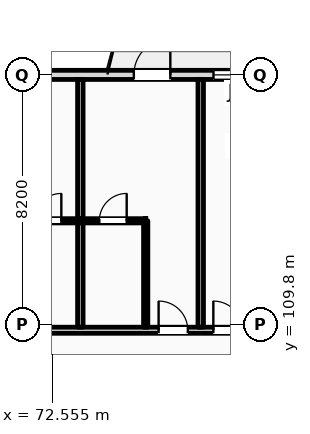
"""IFC4 building model, lengths in metres.
Left out: names, types, materials, properties, quantities, classifications, styles, units other than length and angle.
Written with IfcOpenShell. Run it as: python <this file> out.ifc"""

import sys

from ifc_helpers import new_model, si_unit, direction, frame, frame_2d, origin, place, context, subcontext, project, spatial, rectangle, extrude, element, fill, save


model = new_model("IFC4")
c1 = context("Model", 3, precision=1e-05, world=origin(), true_north=direction((0.0, 1.0)))
c2 = subcontext(c1, "Body", "Model", "MODEL_VIEW")
j1 = project(units=[si_unit("LENGTHUNIT", "METRE"), si_unit("PLANEANGLEUNIT", "RADIAN")], contexts=[c1])
p1 = place(None, origin())
s1 = spatial("IfcSite", under=j1, at=p1, CompositionType="ELEMENT")
p2 = place(p1, origin())
s2 = spatial("IfcBuilding", under=s1, at=p2, CompositionType="ELEMENT")
p3 = place(p2, frame((0.0, 0.0, 20.4)))
s3 = spatial("IfcBuildingStorey", under=s2, at=p3, CompositionType="ELEMENT", Elevation=20.4)
p4 = place(p3, frame((22.5, 118.0, 0.0), z_axis=(0.0, 0.0, 1.0), x_axis=(1.0, 0.0, 0.0)))
e1 = element("IfcWall", 1, at=p4, inside=s3, PredefinedType="STANDARD", context=c2, shape_type="SweptSolid", body=[
    extrude(rectangle(XDim=97.5, YDim=0.3, at=frame_2d((48.75, 0.0))), origin(), (0.0, 0.0, 1.0), 3.38),
])
p5 = place(p4, frame((0.91, 0.0, 0.9)))
e2 = element("IfcOpeningElement", 2, at=p5, cuts=e1, PredefinedType="OPENING", context=c2, shape_type="SweptSolid", body=[
    extrude(rectangle(XDim=0.9, YDim=1.8, at=frame_2d((0.45, 0.9))), frame((0.0, 0.16, 0.0), z_axis=(0.0, -1.0, 0.0), x_axis=(1.0, 0.0, 0.0)), (0.0, 0.0, 1.0), 0.32),
])
p6 = place(p4, frame((6.36, 0.0, 0.0)))
e3 = element("IfcOpeningElement", 3, at=p6, cuts=e1, PredefinedType="OPENING", context=c2, shape_type="SweptSolid", body=[
    extrude(rectangle(XDim=1.2, YDim=2.25, at=frame_2d((0.6, 1.125))), frame((0.0, 0.16, 0.0), z_axis=(0.0, -1.0, 0.0), x_axis=(1.0, 0.0, 0.0)), (0.0, 0.0, 1.0), 0.32),
])
p7 = place(p4, frame((11.41, 0.0, 0.9)))
e4 = element("IfcOpeningElement", 4, at=p7, cuts=e1, PredefinedType="OPENING", context=c2, shape_type="SweptSolid", body=[
    extrude(rectangle(XDim=1.1, YDim=1.9, at=frame_2d((0.55, 0.95))), frame((0.0, 0.16, 0.0), z_axis=(0.0, -1.0, 0.0), x_axis=(1.0, 0.0, 0.0)), (0.0, 0.0, 1.0), 0.32),
])
p8 = place(p4, frame((14.335, 0.0, 0.9)))
e5 = element("IfcOpeningElement", 5, at=p8, cuts=e1, PredefinedType="OPENING", context=c2, shape_type="SweptSolid", body=[
    extrude(rectangle(XDim=1.65, YDim=1.95, at=frame_2d((0.825, 0.975))), frame((0.0, 0.16, 0.0), z_axis=(0.0, -1.0, 0.0), x_axis=(1.0, 0.0, 0.0)), (0.0, 0.0, 1.0), 0.32),
])
p9 = place(p4, frame((19.26, 0.0, 0.9)))
e6 = element("IfcOpeningElement", 6, at=p9, cuts=e1, PredefinedType="OPENING", context=c2, shape_type="SweptSolid", body=[
    extrude(rectangle(XDim=1.35, YDim=2.0, at=frame_2d((0.675, 1.0))), frame((0.0, 0.16, 0.0), z_axis=(0.0, -1.0, 0.0), x_axis=(1.0, 0.0, 0.0)), (0.0, 0.0, 1.0), 0.32),
])
p10 = place(p4, frame((22.8, 0.0, 0.0)))
e7 = element("IfcOpeningElement", 7, at=p10, cuts=e1, PredefinedType="OPENING", context=c2, shape_type="SweptSolid", body=[
    extrude(rectangle(XDim=1.2, YDim=2.25, at=frame_2d((0.6, 1.125))), frame((0.0, 0.16, 0.0), z_axis=(0.0, -1.0, 0.0), x_axis=(1.0, 0.0, 0.0)), (0.0, 0.0, 1.0), 0.32),
])
p11 = place(p4, frame((26.91, 0.0, 0.9)))
e8 = element("IfcOpeningElement", 8, at=p11, cuts=e1, PredefinedType="OPENING", context=c2, shape_type="SweptSolid", body=[
    extrude(rectangle(XDim=2.1, YDim=2.1, at=frame_2d((1.05, 1.05))), frame((0.0, 0.16, 0.0), z_axis=(0.0, -1.0, 0.0), x_axis=(1.0, 0.0, 0.0)), (0.0, 0.0, 1.0), 0.32),
])
p12 = place(p4, frame((30.835, 0.0, 0.9)))
e9 = element("IfcOpeningElement", 9, at=p12, cuts=e1, PredefinedType="OPENING", context=c2, shape_type="SweptSolid", body=[
    extrude(rectangle(XDim=2.25, YDim=2.15, at=frame_2d((1.125, 1.075))), frame((0.0, 0.16, 0.0), z_axis=(0.0, -1.0, 0.0), x_axis=(1.0, 0.0, 0.0)), (0.0, 0.0, 1.0), 0.32),
])
p13 = place(p4, frame((34.96, 0.0, 0.9)))
e10 = element("IfcOpeningElement", 10, at=p13, cuts=e1, PredefinedType="OPENING", context=c2, shape_type="SweptSolid", body=[
    extrude(rectangle(XDim=2.4, YDim=2.2, at=frame_2d((1.2, 1.1))), frame((0.0, 0.16, 0.0), z_axis=(0.0, -1.0, 0.0), x_axis=(1.0, 0.0, 0.0)), (0.0, 0.0, 1.0), 0.32),
])
p14 = place(p4, frame((39.0, 0.0, 0.0)))
e11 = element("IfcOpeningElement", 11, at=p14, cuts=e1, PredefinedType="OPENING", context=c2, shape_type="SweptSolid", body=[
    extrude(rectangle(XDim=1.2, YDim=2.25, at=frame_2d((0.6, 1.125))), frame((0.0, 0.16, 0.0), z_axis=(0.0, -1.0, 0.0), x_axis=(1.0, 0.0, 0.0)), (0.0, 0.0, 1.0), 0.32),
])
p15 = place(p4, frame((43.21, 0.0, 0.9)))
e12 = element("IfcOpeningElement", 12, at=p15, cuts=e1, PredefinedType="OPENING", context=c2, shape_type="SweptSolid", body=[
    extrude(rectangle(XDim=2.7, YDim=2.3, at=frame_2d((1.35, 1.15))), frame((0.0, 0.16, 0.0), z_axis=(0.0, -1.0, 0.0), x_axis=(1.0, 0.0, 0.0)), (0.0, 0.0, 1.0), 0.32),
])
p16 = place(p4, frame((47.335, 0.0, 0.9)))
e13 = element("IfcOpeningElement", 13, at=p16, cuts=e1, PredefinedType="OPENING", context=c2, shape_type="SweptSolid", body=[
    extrude(rectangle(XDim=1.35, YDim=2.3, at=frame_2d((0.675, 1.15))), frame((0.0, 0.16, 0.0), z_axis=(0.0, -1.0, 0.0), x_axis=(1.0, 0.0, 0.0)), (0.0, 0.0, 1.0), 0.32),
])
p17 = place(p4, frame((52.74, 0.0, 0.0)))
e14 = element("IfcOpeningElement", 14, at=p17, cuts=e1, PredefinedType="OPENING", context=c2, shape_type="SweptSolid", body=[
    extrude(rectangle(XDim=1.2, YDim=2.25, at=frame_2d((0.6, 1.125))), frame((0.0, 0.16, 0.0), z_axis=(0.0, -1.0, 0.0), x_axis=(1.0, 0.0, 0.0)), (0.0, 0.0, 1.0), 0.32),
])
p18 = place(p4, frame((55.36, 0.0, 0.9)))
e15 = element("IfcOpeningElement", 15, at=p18, cuts=e1, PredefinedType="OPENING", context=c2, shape_type="SweptSolid", body=[
    extrude(rectangle(XDim=1.1, YDim=2.3, at=frame_2d((0.55, 1.15))), frame((0.0, 0.16, 0.0), z_axis=(0.0, -1.0, 0.0), x_axis=(1.0, 0.0, 0.0)), (0.0, 0.0, 1.0), 0.32),
])
p19 = place(p4, frame((59.99, 0.0, 0.9)))
e16 = element("IfcOpeningElement", 16, at=p19, cuts=e1, PredefinedType="OPENING", context=c2, shape_type="SweptSolid", body=[
    extrude(rectangle(XDim=2.74, YDim=2.3, at=frame_2d((1.37, 1.15))), frame((0.0, 0.16, 0.0), z_axis=(0.0, -1.0, 0.0), x_axis=(1.0, 0.0, 0.0)), (0.0, 0.0, 1.0), 0.32),
])
p20 = place(p4, frame((65.95, 0.0, 0.9)))
e17 = element("IfcOpeningElement", 17, at=p20, cuts=e1, PredefinedType="OPENING", context=c2, shape_type="SweptSolid", body=[
    extrude(rectangle(XDim=1.35, YDim=2.3, at=frame_2d((0.675, 1.15))), frame((0.0, 0.16, 0.0), z_axis=(0.0, -1.0, 0.0), x_axis=(1.0, 0.0, 0.0)), (0.0, 0.0, 1.0), 0.32),
])
p21 = place(p4, frame((69.16, 0.0, 0.0)))
e18 = element("IfcOpeningElement", 18, at=p21, cuts=e1, PredefinedType="OPENING", context=c2, shape_type="SweptSolid", body=[
    extrude(rectangle(XDim=1.2, YDim=2.25, at=frame_2d((0.6, 1.125))), frame((0.0, 0.16, 0.0), z_axis=(0.0, -1.0, 0.0), x_axis=(1.0, 0.0, 0.0)), (0.0, 0.0, 1.0), 0.32),
])
p22 = place(p4, frame((73.75, 0.0, 0.9)))
e19 = element("IfcOpeningElement", 19, at=p22, cuts=e1, PredefinedType="OPENING", context=c2, shape_type="SweptSolid", body=[
    extrude(rectangle(XDim=1.8, YDim=2.3, at=frame_2d((0.9, 1.15))), frame((0.0, 0.16, 0.0), z_axis=(0.0, -1.0, 0.0), x_axis=(1.0, 0.0, 0.0)), (0.0, 0.0, 1.0), 0.32),
])
p23 = place(p4, frame((76.79, 0.0, 0.9)))
e20 = element("IfcOpeningElement", 20, at=p23, cuts=e1, PredefinedType="OPENING", context=c2, shape_type="SweptSolid", body=[
    extrude(rectangle(XDim=2.74, YDim=2.3, at=frame_2d((1.37, 1.15))), frame((0.0, 0.16, 0.0), z_axis=(0.0, -1.0, 0.0), x_axis=(1.0, 0.0, 0.0)), (0.0, 0.0, 1.0), 0.32),
])
p24 = place(p4, frame((81.55, 0.0, 0.9)))
e21 = element("IfcOpeningElement", 21, at=p24, cuts=e1, PredefinedType="OPENING", context=c2, shape_type="SweptSolid", body=[
    extrude(rectangle(XDim=1.8, YDim=2.3, at=frame_2d((0.9, 1.15))), frame((0.0, 0.16, 0.0), z_axis=(0.0, -1.0, 0.0), x_axis=(1.0, 0.0, 0.0)), (0.0, 0.0, 1.0), 0.32),
])
p25 = place(p4, frame((86.01, 0.0, 0.9)))
e22 = element("IfcOpeningElement", 22, at=p25, cuts=e1, PredefinedType="OPENING", context=c2, shape_type="SweptSolid", body=[
    extrude(rectangle(XDim=1.1, YDim=1.5, at=frame_2d((0.55, 0.75))), frame((0.0, 0.16, 0.0), z_axis=(0.0, -1.0, 0.0), x_axis=(1.0, 0.0, 0.0)), (0.0, 0.0, 1.0), 0.32),
])
p26 = place(p4, frame((90.135, 0.0, 0.9)))
e23 = element("IfcOpeningElement", 23, at=p26, cuts=e1, PredefinedType="OPENING", context=c2, shape_type="SweptSolid", body=[
    extrude(rectangle(XDim=1.25, YDim=1.6, at=frame_2d((0.625, 0.8))), frame((0.0, 0.16, 0.0), z_axis=(0.0, -1.0, 0.0), x_axis=(1.0, 0.0, 0.0)), (0.0, 0.0, 1.0), 0.32),
])
p27 = place(p4, frame((94.34, 0.0, 0.9)))
e24 = element("IfcOpeningElement", 24, at=p27, cuts=e1, PredefinedType="OPENING", context=c2, shape_type="SweptSolid", body=[
    extrude(rectangle(XDim=1.4, YDim=1.7, at=frame_2d((0.7, 0.85))), frame((0.0, 0.16, 0.0), z_axis=(0.0, -1.0, 0.0), x_axis=(1.0, 0.0, 0.0)), (0.0, 0.0, 1.0), 0.32),
])
p28 = place(p3, frame((10.65, 109.6, 0.0), z_axis=(0.0, 0.0, 1.0), x_axis=(1.0, 0.0, 0.0)))
e25 = element("IfcWall", 25, at=p28, inside=s3, PredefinedType="PARTITIONING", context=c2, shape_type="SweptSolid", body=[
    extrude(rectangle(XDim=109.21, YDim=0.2, at=frame_2d((54.605, 0.0))), origin(), (0.0, 0.0, 1.0), 3.38),
])
p29 = place(p28, frame((12.535, 0.0, 0.0)))
e26 = element("IfcOpeningElement", 26, at=p29, cuts=e25, PredefinedType="OPENING", context=c2, shape_type="SweptSolid", body=[
    extrude(rectangle(XDim=1.02, YDim=2.2, at=frame_2d((0.51, 1.1))), frame((0.0, 0.11, 0.0), z_axis=(0.0, -1.0, 0.0), x_axis=(1.0, 0.0, 0.0)), (0.0, 0.0, 1.0), 0.22),
])
p30 = place(p28, frame((19.175, 0.0, 0.0)))
e27 = element("IfcOpeningElement", 27, at=p30, cuts=e25, PredefinedType="OPENING", context=c2, shape_type="SweptSolid", body=[
    extrude(rectangle(XDim=1.02, YDim=2.2, at=frame_2d((0.51, 1.1))), frame((0.0, 0.11, 0.0), z_axis=(0.0, -1.0, 0.0), x_axis=(1.0, 0.0, 0.0)), (0.0, 0.0, 1.0), 0.22),
])
p31 = place(p28, frame((23.375, 0.0, 0.0)))
e28 = element("IfcOpeningElement", 28, at=p31, cuts=e25, PredefinedType="OPENING", context=c2, shape_type="SweptSolid", body=[
    extrude(rectangle(XDim=1.02, YDim=2.2, at=frame_2d((0.51, 1.1))), frame((0.0, 0.11, 0.0), z_axis=(0.0, -1.0, 0.0), x_axis=(1.0, 0.0, 0.0)), (0.0, 0.0, 1.0), 0.22),
])
p32 = place(p28, frame((27.575, 0.0, 0.0)))
e29 = element("IfcOpeningElement", 29, at=p32, cuts=e25, PredefinedType="OPENING", context=c2, shape_type="SweptSolid", body=[
    extrude(rectangle(XDim=1.02, YDim=2.2, at=frame_2d((0.51, 1.1))), frame((0.0, 0.11, 0.0), z_axis=(0.0, -1.0, 0.0), x_axis=(1.0, 0.0, 0.0)), (0.0, 0.0, 1.0), 0.22),
])
p33 = place(p28, frame((31.805, 0.0, 0.0)))
e30 = element("IfcOpeningElement", 30, at=p33, cuts=e25, PredefinedType="OPENING", context=c2, shape_type="SweptSolid", body=[
    extrude(rectangle(XDim=0.96, YDim=2.2, at=frame_2d((0.48, 1.1))), frame((0.0, 0.11, 0.0), z_axis=(0.0, -1.0, 0.0), x_axis=(1.0, 0.0, 0.0)), (0.0, 0.0, 1.0), 0.22),
])
p34 = place(p28, frame((33.855, 0.0, 0.0)))
e31 = element("IfcOpeningElement", 31, at=p34, cuts=e25, PredefinedType="OPENING", context=c2, shape_type="SweptSolid", body=[
    extrude(rectangle(XDim=0.96, YDim=2.2, at=frame_2d((0.48, 1.1))), frame((0.0, 0.11, 0.0), z_axis=(0.0, -1.0, 0.0), x_axis=(1.0, 0.0, 0.0)), (0.0, 0.0, 1.0), 0.22),
])
p35 = place(p28, frame((40.205, 0.0, 0.0)))
e32 = element("IfcOpeningElement", 32, at=p35, cuts=e25, PredefinedType="OPENING", context=c2, shape_type="SweptSolid", body=[
    extrude(rectangle(XDim=0.96, YDim=2.2, at=frame_2d((0.48, 1.1))), frame((0.0, 0.11, 0.0), z_axis=(0.0, -1.0, 0.0), x_axis=(1.0, 0.0, 0.0)), (0.0, 0.0, 1.0), 0.22),
])
p36 = place(p28, frame((42.255, 0.0, 0.0)))
e33 = element("IfcOpeningElement", 33, at=p36, cuts=e25, PredefinedType="OPENING", context=c2, shape_type="SweptSolid", body=[
    extrude(rectangle(XDim=0.96, YDim=2.2, at=frame_2d((0.48, 1.1))), frame((0.0, 0.11, 0.0), z_axis=(0.0, -1.0, 0.0), x_axis=(1.0, 0.0, 0.0)), (0.0, 0.0, 1.0), 0.22),
])
p37 = place(p28, frame((48.605, 0.0, 0.0)))
e34 = element("IfcOpeningElement", 34, at=p37, cuts=e25, PredefinedType="OPENING", context=c2, shape_type="SweptSolid", body=[
    extrude(rectangle(XDim=0.96, YDim=2.2, at=frame_2d((0.48, 1.1))), frame((0.0, 0.11, 0.0), z_axis=(0.0, -1.0, 0.0), x_axis=(1.0, 0.0, 0.0)), (0.0, 0.0, 1.0), 0.22),
])
p38 = place(p28, frame((50.655, 0.0, 0.0)))
e35 = element("IfcOpeningElement", 35, at=p38, cuts=e25, PredefinedType="OPENING", context=c2, shape_type="SweptSolid", body=[
    extrude(rectangle(XDim=0.96, YDim=2.2, at=frame_2d((0.48, 1.1))), frame((0.0, 0.11, 0.0), z_axis=(0.0, -1.0, 0.0), x_axis=(1.0, 0.0, 0.0)), (0.0, 0.0, 1.0), 0.22),
])
p39 = place(p28, frame((57.005, 0.0, 0.0)))
e36 = element("IfcOpeningElement", 36, at=p39, cuts=e25, PredefinedType="OPENING", context=c2, shape_type="SweptSolid", body=[
    extrude(rectangle(XDim=0.96, YDim=2.2, at=frame_2d((0.48, 1.1))), frame((0.0, 0.11, 0.0), z_axis=(0.0, -1.0, 0.0), x_axis=(1.0, 0.0, 0.0)), (0.0, 0.0, 1.0), 0.22),
])
p40 = place(p28, frame((59.055, 0.0, 0.0)))
e37 = element("IfcOpeningElement", 37, at=p40, cuts=e25, PredefinedType="OPENING", context=c2, shape_type="SweptSolid", body=[
    extrude(rectangle(XDim=0.96, YDim=2.2, at=frame_2d((0.48, 1.1))), frame((0.0, 0.11, 0.0), z_axis=(0.0, -1.0, 0.0), x_axis=(1.0, 0.0, 0.0)), (0.0, 0.0, 1.0), 0.22),
])
p41 = place(p28, frame((65.405, 0.0, 0.0)))
e38 = element("IfcOpeningElement", 38, at=p41, cuts=e25, PredefinedType="OPENING", context=c2, shape_type="SweptSolid", body=[
    extrude(rectangle(XDim=0.96, YDim=2.2, at=frame_2d((0.48, 1.1))), frame((0.0, 0.11, 0.0), z_axis=(0.0, -1.0, 0.0), x_axis=(1.0, 0.0, 0.0)), (0.0, 0.0, 1.0), 0.22),
])
p42 = place(p28, frame((67.205, 0.0, 0.0)))
e39 = element("IfcOpeningElement", 39, at=p42, cuts=e25, PredefinedType="OPENING", context=c2, shape_type="SweptSolid", body=[
    extrude(rectangle(XDim=0.96, YDim=2.2, at=frame_2d((0.48, 1.1))), frame((0.0, 0.11, 0.0), z_axis=(0.0, -1.0, 0.0), x_axis=(1.0, 0.0, 0.0)), (0.0, 0.0, 1.0), 0.22),
])
p43 = place(p28, frame((73.805, 0.0, 0.0)))
e40 = element("IfcOpeningElement", 40, at=p43, cuts=e25, PredefinedType="OPENING", context=c2, shape_type="SweptSolid", body=[
    extrude(rectangle(XDim=0.96, YDim=2.2, at=frame_2d((0.48, 1.1))), frame((0.0, 0.11, 0.0), z_axis=(0.0, -1.0, 0.0), x_axis=(1.0, 0.0, 0.0)), (0.0, 0.0, 1.0), 0.22),
])
p44 = place(p28, frame((78.255, 0.0, 0.0)))
e41 = element("IfcOpeningElement", 41, at=p44, cuts=e25, PredefinedType="OPENING", context=c2, shape_type="SweptSolid", body=[
    extrude(rectangle(XDim=0.96, YDim=2.2, at=frame_2d((0.48, 1.1))), frame((0.0, 0.11, 0.0), z_axis=(0.0, -1.0, 0.0), x_axis=(1.0, 0.0, 0.0)), (0.0, 0.0, 1.0), 0.22),
])
p45 = place(p28, frame((82.205, 0.0, 0.0)))
e42 = element("IfcOpeningElement", 42, at=p45, cuts=e25, PredefinedType="OPENING", context=c2, shape_type="SweptSolid", body=[
    extrude(rectangle(XDim=0.96, YDim=2.2, at=frame_2d((0.48, 1.1))), frame((0.0, 0.11, 0.0), z_axis=(0.0, -1.0, 0.0), x_axis=(1.0, 0.0, 0.0)), (0.0, 0.0, 1.0), 0.22),
])
p46 = place(p28, frame((86.405, 0.0, 0.0)))
e43 = element("IfcOpeningElement", 43, at=p46, cuts=e25, PredefinedType="OPENING", context=c2, shape_type="SweptSolid", body=[
    extrude(rectangle(XDim=0.96, YDim=2.2, at=frame_2d((0.48, 1.1))), frame((0.0, 0.11, 0.0), z_axis=(0.0, -1.0, 0.0), x_axis=(1.0, 0.0, 0.0)), (0.0, 0.0, 1.0), 0.22),
])
p47 = place(p28, frame((90.605, 0.0, 0.0)))
e44 = element("IfcOpeningElement", 44, at=p47, cuts=e25, PredefinedType="OPENING", context=c2, shape_type="SweptSolid", body=[
    extrude(rectangle(XDim=0.96, YDim=2.2, at=frame_2d((0.48, 1.1))), frame((0.0, 0.11, 0.0), z_axis=(0.0, -1.0, 0.0), x_axis=(1.0, 0.0, 0.0)), (0.0, 0.0, 1.0), 0.22),
])
p48 = place(p28, frame((94.805, 0.0, 0.0)))
e45 = element("IfcOpeningElement", 45, at=p48, cuts=e25, PredefinedType="OPENING", context=c2, shape_type="SweptSolid", body=[
    extrude(rectangle(XDim=0.96, YDim=2.2, at=frame_2d((0.48, 1.1))), frame((0.0, 0.11, 0.0), z_axis=(0.0, -1.0, 0.0), x_axis=(1.0, 0.0, 0.0)), (0.0, 0.0, 1.0), 0.22),
])
p49 = place(p28, frame((99.005, 0.0, 0.0)))
e46 = element("IfcOpeningElement", 46, at=p49, cuts=e25, PredefinedType="OPENING", context=c2, shape_type="SweptSolid", body=[
    extrude(rectangle(XDim=0.96, YDim=2.2, at=frame_2d((0.48, 1.1))), frame((0.0, 0.11, 0.0), z_axis=(0.0, -1.0, 0.0), x_axis=(1.0, 0.0, 0.0)), (0.0, 0.0, 1.0), 0.22),
])
p50 = place(p28, frame((103.205, 0.0, 0.0)))
e47 = element("IfcOpeningElement", 47, at=p50, cuts=e25, PredefinedType="OPENING", context=c2, shape_type="SweptSolid", body=[
    extrude(rectangle(XDim=0.96, YDim=2.2, at=frame_2d((0.48, 1.1))), frame((0.0, 0.11, 0.0), z_axis=(0.0, -1.0, 0.0), x_axis=(1.0, 0.0, 0.0)), (0.0, 0.0, 1.0), 0.22),
])
p51 = place(p28, frame((105.335, 0.0, 0.0)))
e48 = element("IfcOpeningElement", 48, at=p51, cuts=e25, PredefinedType="OPENING", context=c2, shape_type="SweptSolid", body=[
    extrude(rectangle(XDim=0.96, YDim=2.2, at=frame_2d((0.48, 1.1))), frame((0.0, 0.11, 0.0), z_axis=(0.0, -1.0, 0.0), x_axis=(1.0, 0.0, 0.0)), (0.0, 0.0, 1.0), 0.22),
])
p52 = place(p28, frame((2.716, 0.0, 0.0)))
e49 = element("IfcOpeningElement", 49, at=p52, cuts=e25, PredefinedType="OPENING", context=c2, shape_type="SweptSolid", body=[
    extrude(rectangle(XDim=1.35, YDim=2.25, at=frame_2d((0.675, 1.125))), frame((0.0, 0.11, 0.0), z_axis=(0.0, -1.0, 0.0), x_axis=(1.0, 0.0, 0.0)), (0.0, 0.0, 1.0), 0.22),
])
p53 = place(p28, frame((6.65, 0.0, 0.0)))
e50 = element("IfcOpeningElement", 50, at=p53, cuts=e25, PredefinedType="OPENING", context=c2, shape_type="SweptSolid", body=[
    extrude(rectangle(XDim=1.35, YDim=2.25, at=frame_2d((0.675, 1.125))), frame((0.0, 0.11, 0.0), z_axis=(0.0, -1.0, 0.0), x_axis=(1.0, 0.0, 0.0)), (0.0, 0.0, 1.0), 0.22),
])
p54 = place(p28, frame((10.583, 0.0, 0.0)))
e51 = element("IfcOpeningElement", 51, at=p54, cuts=e25, PredefinedType="OPENING", context=c2, shape_type="SweptSolid", body=[
    extrude(rectangle(XDim=1.35, YDim=2.25, at=frame_2d((0.675, 1.125))), frame((0.0, 0.11, 0.0), z_axis=(0.0, -1.0, 0.0), x_axis=(1.0, 0.0, 0.0)), (0.0, 0.0, 1.0), 0.22),
])
p55 = place(p3, frame((73.48, 109.7, 0.0), z_axis=(0.0, 0.0, 1.0), x_axis=(0.0, 1.0, 0.0)))
e52 = element("IfcWall", 52, at=p55, inside=s3, PredefinedType="PARTITIONING", context=c2, shape_type="SweptSolid", body=[
    extrude(rectangle(XDim=8.15, YDim=0.18, at=frame_2d((4.075, 0.0))), origin(), (0.0, 0.0, 1.0), 3.94),
])
p56 = place(p3, frame((71.33, 113.2, 0.0), z_axis=(0.0, 0.0, 1.0), x_axis=(1.0, 0.0, 0.0)))
e53 = element("IfcWall", 53, at=p56, inside=s3, PredefinedType="PARTITIONING", context=c2, shape_type="SweptSolid", body=[
    extrude(rectangle(XDim=2.15, YDim=0.14, at=frame_2d((1.075, 0.0))), origin(), (0.0, 0.0, 1.0), 3.94),
])
p57 = place(p56, frame((0.625, 0.0, 0.0)))
e54 = element("IfcOpeningElement", 54, at=p57, cuts=e53, PredefinedType="OPENING", context=c2, shape_type="SweptSolid", body=[
    extrude(rectangle(XDim=0.9, YDim=2.1, at=frame_2d((0.45, 1.05))), frame((0.0, 0.08, 0.0), z_axis=(0.0, -1.0, 0.0), x_axis=(1.0, 0.0, 0.0)), (0.0, 0.0, 1.0), 0.16),
])
p58 = place(p3, frame((77.44, 109.7, 0.0), z_axis=(0.0, 0.0, 1.0), x_axis=(0.0, 1.0, 0.0)))
e55 = element("IfcWall", 55, at=p58, inside=s3, PredefinedType="PARTITIONING", context=c2, shape_type="SweptSolid", body=[
    extrude(rectangle(XDim=8.15, YDim=0.18, at=frame_2d((4.075, 0.0))), origin(), (0.0, 0.0, 1.0), 3.63),
])
p59 = place(p3, frame((75.63, 109.7, 0.0), z_axis=(0.0, 0.0, 1.0), x_axis=(0.0, 1.0, 0.0)))
e56 = element("IfcWall", 56, at=p59, inside=s3, PredefinedType="PARTITIONING", context=c2, shape_type="SweptSolid", body=[
    extrude(rectangle(XDim=3.5, YDim=0.14, at=frame_2d((1.75, 0.0))), origin(), (0.0, 0.0, 1.0), 3.94),
])
p60 = place(p3, frame((73.48, 113.2, 0.0), z_axis=(0.0, 0.0, 1.0), x_axis=(1.0, 0.0, 0.0)))
e57 = element("IfcWall", 57, at=p60, inside=s3, PredefinedType="PARTITIONING", context=c2, shape_type="SweptSolid", body=[
    extrude(rectangle(XDim=2.15, YDim=0.14, at=frame_2d((1.075, 0.0))), origin(), (0.0, 0.0, 1.0), 3.94),
])
p61 = place(p60, frame((0.625, 0.0, 0.0)))
e58 = element("IfcOpeningElement", 58, at=p61, cuts=e57, PredefinedType="OPENING", context=c2, shape_type="SweptSolid", body=[
    extrude(rectangle(XDim=0.9, YDim=2.1, at=frame_2d((0.45, 1.05))), frame((0.0, 0.08, 0.0), z_axis=(0.0, -1.0, 0.0), x_axis=(1.0, 0.0, 0.0)), (0.0, 0.0, 1.0), 0.16),
])
p62 = place(p17, origin())
e59 = element("IfcDoor", 59, at=p62, inside=s3, OperationType="SINGLE_SWING_RIGHT", PredefinedType="DOOR", context=c2, shape_type="SweptSolid", body=[
    extrude(rectangle(XDim=1.2, YDim=2.25, at=frame_2d((0.6, 1.125))), frame((0.0, 0.025, 0.0), z_axis=(0.0, -1.0, 0.0), x_axis=(1.0, 0.0, 0.0)), (0.0, 0.0, 1.0), 0.05),
])
fill(e14, e59)
p63 = place(p18, origin())
e60 = element("IfcWindow", 60, at=p63, inside=s3, PartitioningType="DOUBLE_PANEL_VERTICAL", PredefinedType="WINDOW", context=c2, shape_type="SweptSolid", body=[
    extrude(rectangle(XDim=1.1, YDim=2.3, at=frame_2d((0.55, 1.15))), frame((0.0, 0.03, 0.0), z_axis=(0.0, -1.0, 0.0), x_axis=(1.0, 0.0, 0.0)), (0.0, 0.0, 1.0), 0.06),
])
fill(e15, e60)
p64 = place(p57, origin())
e61 = element("IfcDoor", 61, at=p64, inside=s3, OperationType="SINGLE_SWING_RIGHT", PredefinedType="DOOR", context=c2, shape_type="SweptSolid", body=[
    extrude(rectangle(XDim=0.9, YDim=2.1, at=frame_2d((0.45, 1.05))), frame((0.0, 0.025, 0.0), z_axis=(0.0, -1.0, 0.0), x_axis=(1.0, 0.0, 0.0)), (0.0, 0.0, 1.0), 0.05),
])
fill(e54, e61)
p65 = place(p41, origin())
e62 = element("IfcDoor", 62, at=p65, inside=s3, OperationType="SINGLE_SWING_LEFT", PredefinedType="DOOR", context=c2, shape_type="SweptSolid", body=[
    extrude(rectangle(XDim=0.96, YDim=2.2, at=frame_2d((0.48, 1.1))), frame((0.0, 0.025, 0.0), z_axis=(0.0, -1.0, 0.0), x_axis=(1.0, 0.0, 0.0)), (0.0, 0.0, 1.0), 0.05),
])
fill(e38, e62)
p66 = place(p61, origin())
e63 = element("IfcDoor", 63, at=p66, inside=s3, OperationType="SINGLE_SWING_RIGHT", PredefinedType="DOOR", context=c2, shape_type="SweptSolid", body=[
    extrude(rectangle(XDim=0.9, YDim=2.1, at=frame_2d((0.45, 1.05))), frame((0.0, 0.025, 0.0), z_axis=(0.0, -1.0, 0.0), x_axis=(1.0, 0.0, 0.0)), (0.0, 0.0, 1.0), 0.05),
])
fill(e58, e63)
p67 = place(p42, origin())
e64 = element("IfcDoor", 64, at=p67, inside=s3, OperationType="SINGLE_SWING_LEFT", PredefinedType="DOOR", context=c2, shape_type="SweptSolid", body=[
    extrude(rectangle(XDim=0.96, YDim=2.2, at=frame_2d((0.48, 1.1))), frame((0.0, 0.025, 0.0), z_axis=(0.0, -1.0, 0.0), x_axis=(1.0, 0.0, 0.0)), (0.0, 0.0, 1.0), 0.05),
])
fill(e39, e64)
save(model, sys.argv[1])
